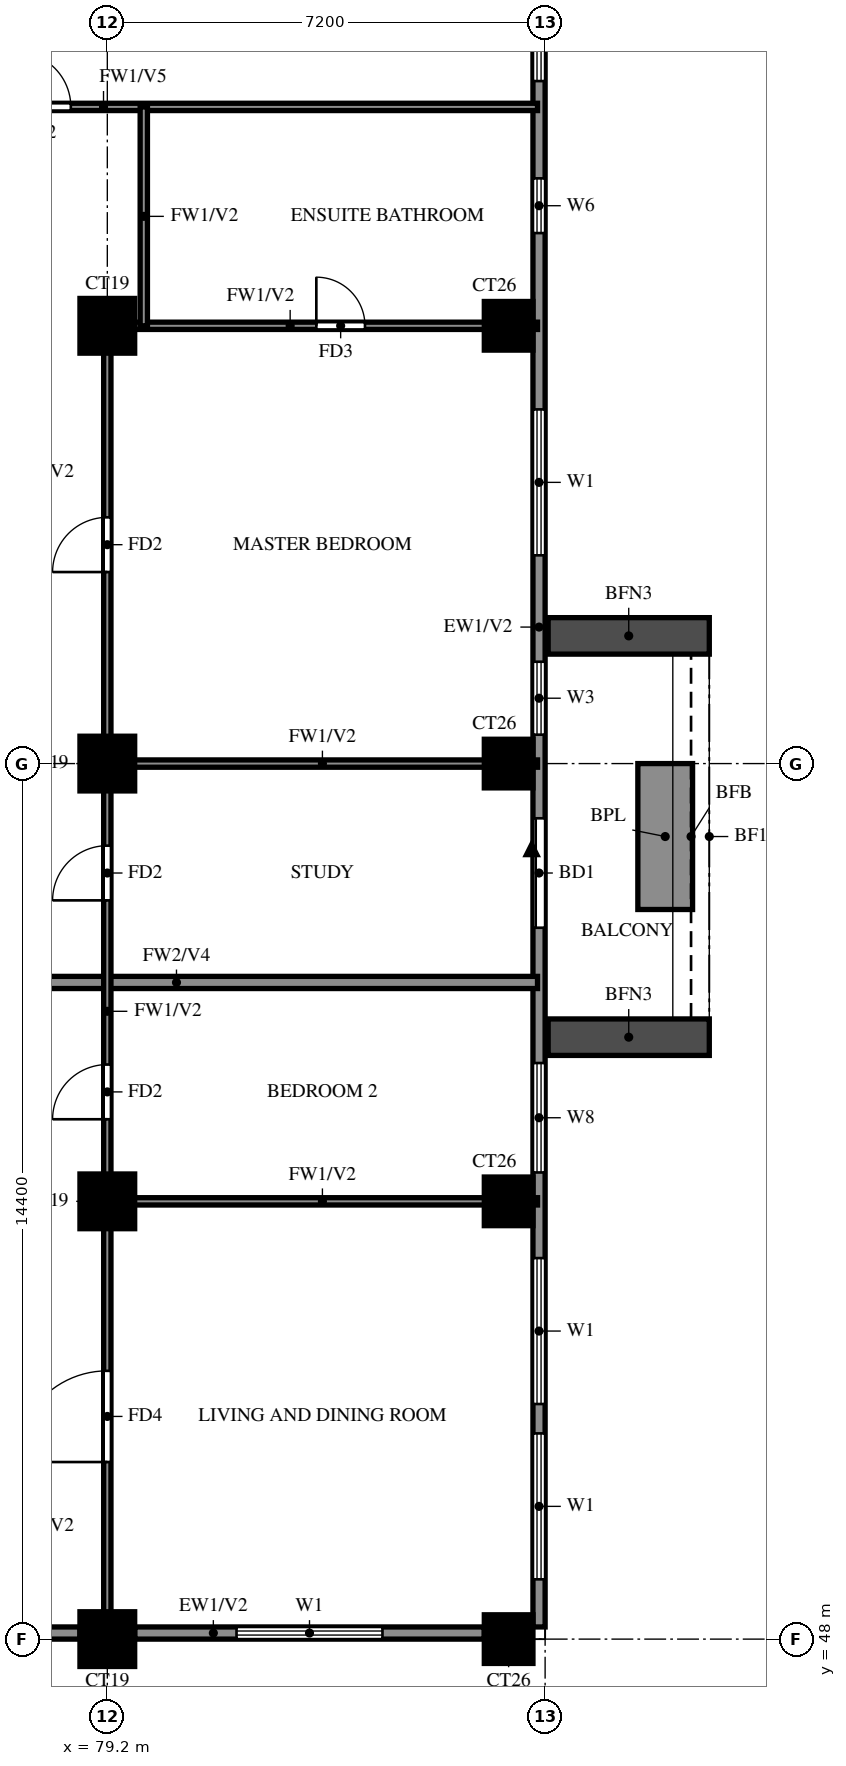
"""IFC4 building model, lengths in metres.
Left out: names, types, materials, properties, quantities, classifications, styles, units other than length and angle.
Written with IfcOpenShell. Run it as: python <this file> out.ifc"""

import sys

from ifc_helpers import new_model, si_unit, direction, frame, frame_2d, origin, origin_2d, place, context, subcontext, project, spatial, rectangle, extrude, source, transform, mapped, element, fill, save


model = new_model("IFC4")
c1 = context("Model", 3, precision=1e-05, world=origin(), true_north=direction((0.0, 1.0)))
c2 = subcontext(c1, "Body", "Model", "MODEL_VIEW")
j1 = project(units=[si_unit("LENGTHUNIT", "METRE"), si_unit("PLANEANGLEUNIT", "RADIAN")], contexts=[c1])
p1 = place(None, origin())
s1 = spatial("IfcSite", under=j1, at=p1, CompositionType="ELEMENT")
p2 = place(p1, origin())
s2 = spatial("IfcBuilding", under=s1, at=p2, CompositionType="ELEMENT")
p3 = place(p2, frame((0.0, 0.0, 178.0)))
s3 = spatial("IfcBuildingStorey", under=s2, at=p3, CompositionType="ELEMENT", Elevation=178.0)
m1 = source(origin(), c2, "Body", "SweptSolid", [
    extrude(rectangle(XDim=0.9, YDim=0.9, at=origin_2d()), origin(), (0.0, 0.0, 1.0), 3.2),
])
p4 = place(p3, frame((79.2, 48.0, 0.0), z_axis=(0.0, 0.0, 1.0), x_axis=(1.0, 0.0, 0.0)))
e1 = element("IfcColumn", 1, at=p4, inside=s3, PredefinedType="COLUMN", context=c2, shape_type="MappedRepresentation", body=[
    mapped(m1, transform((0.0, 0.0, 0.0))),
])
m2 = source(origin(), c2, "Body", "SweptSolid", [
    extrude(rectangle(XDim=0.8, YDim=0.8, at=origin_2d()), origin(), (0.0, 0.0, 1.0), 3.2),
])
p5 = place(p3, frame((85.8, 48.0, 0.0), z_axis=(0.0, 0.0, 1.0), x_axis=(1.0, 0.0, 0.0)))
e2 = element("IfcColumn", 2, at=p5, inside=s3, PredefinedType="COLUMN", context=c2, shape_type="MappedRepresentation", body=[
    mapped(m2, transform((0.0, 0.0, 0.0))),
])
p6 = place(p3, frame((79.2, 55.2, 0.0), z_axis=(0.0, 0.0, 1.0), x_axis=(1.0, 0.0, 0.0)))
e3 = element("IfcColumn", 3, at=p6, inside=s3, PredefinedType="COLUMN", context=c2, shape_type="MappedRepresentation", body=[
    mapped(m1, transform((0.0, 0.0, 0.0))),
])
p7 = place(p3, frame((85.8, 55.2, 0.0), z_axis=(0.0, 0.0, 1.0), x_axis=(1.0, 0.0, 0.0)))
e4 = element("IfcColumn", 4, at=p7, inside=s3, PredefinedType="COLUMN", context=c2, shape_type="MappedRepresentation", body=[
    mapped(m2, transform((0.0, 0.0, 0.0))),
])
p8 = place(p3, frame((79.2, 62.4, 0.0), z_axis=(0.0, 0.0, 1.0), x_axis=(1.0, 0.0, 0.0)))
e5 = element("IfcColumn", 5, at=p8, inside=s3, PredefinedType="COLUMN", context=c2, shape_type="MappedRepresentation", body=[
    mapped(m1, transform((0.0, 0.0, 0.0))),
])
p9 = place(p3, frame((85.8, 62.4, 0.0), z_axis=(0.0, 0.0, 1.0), x_axis=(1.0, 0.0, 0.0)))
e6 = element("IfcColumn", 6, at=p9, inside=s3, PredefinedType="COLUMN", context=c2, shape_type="MappedRepresentation", body=[
    mapped(m2, transform((0.0, 0.0, 0.0))),
])
p10 = place(p3, frame((79.2, 69.6, 0.0), z_axis=(0.0, 0.0, 1.0), x_axis=(1.0, 0.0, 0.0)))
e7 = element("IfcColumn", 7, at=p10, inside=s3, PredefinedType="COLUMN", context=c2, shape_type="MappedRepresentation", body=[
    mapped(m1, transform((0.0, 0.0, 0.0))),
])
p11 = place(p3, frame((85.8, 69.6, 0.0), z_axis=(0.0, 0.0, 1.0), x_axis=(1.0, 0.0, 0.0)))
e8 = element("IfcColumn", 8, at=p11, inside=s3, PredefinedType="COLUMN", context=c2, shape_type="MappedRepresentation", body=[
    mapped(m2, transform((0.0, 0.0, 0.0))),
])
p12 = place(p3, frame((85.719, 39.881, 0.0), z_axis=(0.0, 0.0, 1.0), x_axis=(-0.86377618652, 0.503875678716, 0.0)))
e9 = element("IfcWall", 9, at=p12, inside=s3, PredefinedType="SOLIDWALL", context=c2, shape_type="SweptSolid", body=[
    extrude(rectangle(XDim=16.311, YDim=0.2, at=frame_2d((8.156, 0.0))), origin(), (0.0, 0.0, 1.0), 3.2),
])
p13 = place(p12, frame((13.326, 0.0, 1.5)))
e10 = element("IfcOpeningElement", 10, at=p13, cuts=e9, PredefinedType="OPENING", context=c2, shape_type="SweptSolid", body=[
    extrude(rectangle(XDim=0.9, YDim=0.9, at=frame_2d((0.45, 0.45))), frame((0.0, 0.11, 0.0), z_axis=(0.0, -1.0, 0.0), x_axis=(1.0, 0.0, 0.0)), (0.0, 0.0, 1.0), 0.22),
])
p14 = place(p3, frame((71.99, 48.1, 0.0), z_axis=(0.0, 0.0, 1.0), x_axis=(1.0, 0.0, 0.0)))
e11 = element("IfcWall", 11, at=p14, inside=s3, PredefinedType="SOLIDWALL", context=c2, shape_type="SweptSolid", body=[
    extrude(rectangle(XDim=6.76, YDim=0.2, at=frame_2d((3.38, 0.0))), origin(), (0.0, 0.0, 1.0), 3.2),
])
p15 = place(p14, frame((2.205, 0.0, 1.5)))
e12 = element("IfcOpeningElement", 12, at=p15, cuts=e11, PredefinedType="OPENING", context=c2, shape_type="SweptSolid", body=[
    extrude(rectangle(XDim=0.9, YDim=0.9, at=frame_2d((0.45, 0.45))), frame((0.0, 0.11, 0.0), z_axis=(0.0, -1.0, 0.0), x_axis=(1.0, 0.0, 0.0)), (0.0, 0.0, 1.0), 0.22),
])
p16 = place(p3, frame((79.65, 48.1, 0.0), z_axis=(0.0, 0.0, 1.0), x_axis=(1.0, 0.0, 0.0)))
e13 = element("IfcWall", 13, at=p16, inside=s3, PredefinedType="SOLIDWALL", context=c2, shape_type="SweptSolid", body=[
    extrude(rectangle(XDim=5.75, YDim=0.2, at=frame_2d((2.875, 0.0))), origin(), (0.0, 0.0, 1.0), 3.2),
])
p17 = place(p16, frame((1.675, 0.0, 0.6)))
e14 = element("IfcOpeningElement", 14, at=p17, cuts=e13, PredefinedType="OPENING", context=c2, shape_type="SweptSolid", body=[
    extrude(rectangle(XDim=2.4, YDim=2.4, at=frame_2d((1.2, 1.2))), frame((0.0, 0.11, 0.0), z_axis=(0.0, -1.0, 0.0), x_axis=(1.0, 0.0, 0.0)), (0.0, 0.0, 1.0), 0.22),
])
p18 = place(p3, frame((86.3, 48.2, 0.0), z_axis=(0.0, 0.0, 1.0), x_axis=(0.0, 1.0, 0.0)))
e15 = element("IfcWall", 15, at=p18, inside=s3, PredefinedType="SOLIDWALL", context=c2, shape_type="SweptSolid", body=[
    extrude(rectangle(XDim=28.6, YDim=0.2, at=frame_2d((14.3, 0.0))), origin(), (0.0, 0.0, 1.0), 3.2),
])
p19 = place(p18, frame((11.5, 0.0, 0.0)))
e16 = element("IfcOpeningElement", 16, at=p19, cuts=e15, PredefinedType="OPENING", context=c2, shape_type="SweptSolid", body=[
    extrude(rectangle(XDim=1.8, YDim=2.4, at=frame_2d((0.9, 1.2))), frame((0.0, 0.11, 0.0), z_axis=(0.0, -1.0, 0.0), x_axis=(1.0, 0.0, 0.0)), (0.0, 0.0, 1.0), 0.22),
])
p20 = place(p18, frame((0.783, 0.0, 0.6)))
e17 = element("IfcOpeningElement", 17, at=p20, cuts=e15, PredefinedType="OPENING", context=c2, shape_type="SweptSolid", body=[
    extrude(rectangle(XDim=2.4, YDim=2.4, at=frame_2d((1.2, 1.2))), frame((0.0, 0.11, 0.0), z_axis=(0.0, -1.0, 0.0), x_axis=(1.0, 0.0, 0.0)), (0.0, 0.0, 1.0), 0.22),
])
p21 = place(p18, frame((3.667, 0.0, 0.6)))
e18 = element("IfcOpeningElement", 18, at=p21, cuts=e15, PredefinedType="OPENING", context=c2, shape_type="SweptSolid", body=[
    extrude(rectangle(XDim=2.4, YDim=2.4, at=frame_2d((1.2, 1.2))), frame((0.0, 0.11, 0.0), z_axis=(0.0, -1.0, 0.0), x_axis=(1.0, 0.0, 0.0)), (0.0, 0.0, 1.0), 0.22),
])
p22 = place(p18, frame((7.475, 0.0, 0.6)))
e19 = element("IfcOpeningElement", 19, at=p22, cuts=e15, PredefinedType="OPENING", context=c2, shape_type="SweptSolid", body=[
    extrude(rectangle(XDim=1.8, YDim=2.4, at=frame_2d((0.9, 1.2))), frame((0.0, 0.11, 0.0), z_axis=(0.0, -1.0, 0.0), x_axis=(1.0, 0.0, 0.0)), (0.0, 0.0, 1.0), 0.22),
])
p23 = place(p18, frame((14.675, 0.0, 0.6)))
e20 = element("IfcOpeningElement", 20, at=p23, cuts=e15, PredefinedType="OPENING", context=c2, shape_type="SweptSolid", body=[
    extrude(rectangle(XDim=1.2, YDim=2.4, at=frame_2d((0.6, 1.2))), frame((0.0, 0.11, 0.0), z_axis=(0.0, -1.0, 0.0), x_axis=(1.0, 0.0, 0.0)), (0.0, 0.0, 1.0), 0.22),
])
p24 = place(p18, frame((17.625, 0.0, 0.6)))
e21 = element("IfcOpeningElement", 21, at=p24, cuts=e15, PredefinedType="OPENING", context=c2, shape_type="SweptSolid", body=[
    extrude(rectangle(XDim=2.4, YDim=2.4, at=frame_2d((1.2, 1.2))), frame((0.0, 0.11, 0.0), z_axis=(0.0, -1.0, 0.0), x_axis=(1.0, 0.0, 0.0)), (0.0, 0.0, 1.0), 0.22),
])
p25 = place(p18, frame((22.925, 0.0, 1.5)))
e22 = element("IfcOpeningElement", 22, at=p25, cuts=e15, PredefinedType="OPENING", context=c2, shape_type="SweptSolid", body=[
    extrude(rectangle(XDim=0.9, YDim=0.9, at=frame_2d((0.45, 0.45))), frame((0.0, 0.11, 0.0), z_axis=(0.0, -1.0, 0.0), x_axis=(1.0, 0.0, 0.0)), (0.0, 0.0, 1.0), 0.22),
])
p26 = place(p18, frame((25.425, 0.0, 0.6)))
e23 = element("IfcOpeningElement", 23, at=p26, cuts=e15, PredefinedType="OPENING", context=c2, shape_type="SweptSolid", body=[
    extrude(rectangle(XDim=2.4, YDim=2.4, at=frame_2d((1.2, 1.2))), frame((0.0, 0.11, 0.0), z_axis=(0.0, -1.0, 0.0), x_axis=(1.0, 0.0, 0.0)), (0.0, 0.0, 1.0), 0.22),
])
for number, where, z_axis, x_axis in (
    (24, (86.45, 57.9, 0.0), (0.0, 0.0, 1.0), (1.0, 0.0, 0.0)),
    (25, (86.45, 64.5, 0.0), (0.0, 0.0, 1.0), (1.0, 0.0, 0.0)),
):
    element("IfcWall", number, at=place(p3, frame(where, z_axis=z_axis, x_axis=x_axis)), inside=s3, PredefinedType="SOLIDWALL", context=c2, shape_type="SweptSolid", body=[
        extrude(rectangle(XDim=2.65, YDim=0.6, at=frame_2d((1.325, 0.0))), origin(), (0.0, 0.0, 1.0), 2.85),
    ])
p27 = place(p3, frame((88.375, 60.0, 0.0), z_axis=(0.0, 0.0, 1.0), x_axis=(0.0, 1.0, 0.0)))
e26 = element("IfcWall", 26, at=p27, inside=s3, PredefinedType="SOLIDWALL", context=c2, shape_type="SweptSolid", body=[
    extrude(rectangle(XDim=2.4, YDim=0.9, at=frame_2d((1.2, 0.0))), origin(), (0.0, 0.0, 1.0), 0.9),
])
p28 = place(p3, frame((74.4, 58.8, 0.0), z_axis=(0.0, 0.0, 1.0), x_axis=(1.0, 0.0, 0.0)))
e27 = element("IfcWall", 27, at=p28, inside=s3, PredefinedType="SOLIDWALL", context=c2, shape_type="SweptSolid", body=[
    extrude(rectangle(XDim=11.875, YDim=0.2, at=frame_2d((5.938, 0.0))), origin(), (0.0, 0.0, 1.0), 2.3),
])
for number, where, z_axis, x_axis in (
    (28, (79.2, 55.2, 0.0), (0.0, 0.0, 1.0), (1.0, 0.0, 0.0)),
    (29, (79.2, 62.4, 0.0), (0.0, 0.0, 1.0), (1.0, 0.0, 0.0)),
):
    element("IfcWall", number, at=place(p3, frame(where, z_axis=z_axis, x_axis=x_axis)), inside=s3, PredefinedType="PARTITIONING", context=c2, shape_type="SweptSolid", body=[
        extrude(rectangle(XDim=7.075, YDim=0.12, at=frame_2d((3.538, 0.0))), origin(), (0.0, 0.0, 1.0), 3.2),
    ])
p29 = place(p3, frame((79.2, 69.6, 0.0), z_axis=(0.0, 0.0, 1.0), x_axis=(1.0, 0.0, 0.0)))
e30 = element("IfcWall", 30, at=p29, inside=s3, PredefinedType="PARTITIONING", context=c2, shape_type="SweptSolid", body=[
    extrude(rectangle(XDim=7.075, YDim=0.12, at=frame_2d((3.538, 0.0))), origin(), (0.0, 0.0, 1.0), 3.2),
])
p30 = place(p29, frame((3.438, 0.0, 0.0)))
e31 = element("IfcOpeningElement", 31, at=p30, cuts=e30, PredefinedType="OPENING", context=c2, shape_type="SweptSolid", body=[
    extrude(rectangle(XDim=0.8, YDim=2.1, at=frame_2d((0.4, 1.05))), frame((0.0, 0.07, 0.0), z_axis=(0.0, -1.0, 0.0), x_axis=(1.0, 0.0, 0.0)), (0.0, 0.0, 1.0), 0.14),
])
p31 = place(p3, frame((72.0, 73.2, 0.0), z_axis=(0.0, 0.0, 1.0), x_axis=(1.0, 0.0, 0.0)))
e32 = element("IfcWall", 32, at=p31, inside=s3, PredefinedType="PARTITIONING", context=c2, shape_type="SweptSolid", body=[
    extrude(rectangle(XDim=14.275, YDim=0.12, at=frame_2d((7.137, 0.0))), origin(), (0.0, 0.0, 1.0), 2.3),
])
p32 = place(p31, frame((5.7, 0.0, 0.0)))
e33 = element("IfcOpeningElement", 33, at=p32, cuts=e32, PredefinedType="OPENING", context=c2, shape_type="SweptSolid", body=[
    extrude(rectangle(XDim=0.9, YDim=2.1, at=frame_2d((0.45, 1.05))), frame((0.0, 0.07, 0.0), z_axis=(0.0, -1.0, 0.0), x_axis=(1.0, 0.0, 0.0)), (0.0, 0.0, 1.0), 0.14),
])
p33 = place(p3, frame((79.2, 48.125, 0.0), z_axis=(0.0, 0.0, 1.0), x_axis=(0.0, 1.0, 0.0)))
e34 = element("IfcWall", 34, at=p33, inside=s3, PredefinedType="PARTITIONING", context=c2, shape_type="SweptSolid", body=[
    extrude(rectangle(XDim=21.475, YDim=0.12, at=frame_2d((10.738, 0.0))), origin(), (0.0, 0.0, 1.0), 3.2),
])
p34 = place(p33, frame((2.788, 0.0, 0.0)))
e35 = element("IfcOpeningElement", 35, at=p34, cuts=e34, PredefinedType="OPENING", context=c2, shape_type="SweptSolid", body=[
    extrude(rectangle(XDim=1.5, YDim=2.1, at=frame_2d((0.75, 1.05))), frame((0.0, 0.07, 0.0), z_axis=(0.0, -1.0, 0.0), x_axis=(1.0, 0.0, 0.0)), (0.0, 0.0, 1.0), 0.14),
])
p35 = place(p33, frame((8.425, 0.0, 0.0)))
e36 = element("IfcOpeningElement", 36, at=p35, cuts=e34, PredefinedType="OPENING", context=c2, shape_type="SweptSolid", body=[
    extrude(rectangle(XDim=0.9, YDim=2.1, at=frame_2d((0.45, 1.05))), frame((0.0, 0.07, 0.0), z_axis=(0.0, -1.0, 0.0), x_axis=(1.0, 0.0, 0.0)), (0.0, 0.0, 1.0), 0.14),
])
p36 = place(p33, frame((12.025, 0.0, 0.0)))
e37 = element("IfcOpeningElement", 37, at=p36, cuts=e34, PredefinedType="OPENING", context=c2, shape_type="SweptSolid", body=[
    extrude(rectangle(XDim=0.9, YDim=2.1, at=frame_2d((0.45, 1.05))), frame((0.0, 0.07, 0.0), z_axis=(0.0, -1.0, 0.0), x_axis=(1.0, 0.0, 0.0)), (0.0, 0.0, 1.0), 0.14),
])
p37 = place(p33, frame((17.425, 0.0, 0.0)))
e38 = element("IfcOpeningElement", 38, at=p37, cuts=e34, PredefinedType="OPENING", context=c2, shape_type="SweptSolid", body=[
    extrude(rectangle(XDim=0.9, YDim=2.1, at=frame_2d((0.45, 1.05))), frame((0.0, 0.07, 0.0), z_axis=(0.0, -1.0, 0.0), x_axis=(1.0, 0.0, 0.0)), (0.0, 0.0, 1.0), 0.14),
])
p38 = place(p3, frame((79.8, 69.6, 0.0), z_axis=(0.0, 0.0, 1.0), x_axis=(0.0, 1.0, 0.0)))
e39 = element("IfcWall", 39, at=p38, inside=s3, PredefinedType="PARTITIONING", context=c2, shape_type="SweptSolid", body=[
    extrude(rectangle(XDim=3.6, YDim=0.12, at=frame_2d((1.8, 0.0))), origin(), (0.0, 0.0, 1.0), 3.2),
])
p39 = place(p17, origin())
e40 = element("IfcWindow", 40, at=p39, inside=s3, PartitioningType="DOUBLE_PANEL_VERTICAL", PredefinedType="WINDOW", context=c2, shape_type="SweptSolid", body=[
    extrude(rectangle(XDim=2.4, YDim=2.4, at=frame_2d((1.2, 1.2))), frame((0.0, 0.03, 0.0), z_axis=(0.0, -1.0, 0.0), x_axis=(1.0, 0.0, 0.0)), (0.0, 0.0, 1.0), 0.06),
])
fill(e14, e40)
p40 = place(p19, origin())
e41 = element("IfcDoor", 41, at=p40, inside=s3, OperationType="DOUBLE_DOOR_SLIDING", PredefinedType="DOOR", context=c2, shape_type="SweptSolid", body=[
    extrude(rectangle(XDim=1.8, YDim=2.4, at=frame_2d((0.9, 1.2))), frame((0.0, 0.025, 0.0), z_axis=(0.0, -1.0, 0.0), x_axis=(1.0, 0.0, 0.0)), (0.0, 0.0, 1.0), 0.05),
])
fill(e16, e41)
p41 = place(p20, origin())
e42 = element("IfcWindow", 42, at=p41, inside=s3, PartitioningType="DOUBLE_PANEL_VERTICAL", PredefinedType="WINDOW", context=c2, shape_type="SweptSolid", body=[
    extrude(rectangle(XDim=2.4, YDim=2.4, at=frame_2d((1.2, 1.2))), frame((0.0, 0.03, 0.0), z_axis=(0.0, -1.0, 0.0), x_axis=(1.0, 0.0, 0.0)), (0.0, 0.0, 1.0), 0.06),
])
fill(e17, e42)
p42 = place(p21, origin())
e43 = element("IfcWindow", 43, at=p42, inside=s3, PartitioningType="DOUBLE_PANEL_VERTICAL", PredefinedType="WINDOW", context=c2, shape_type="SweptSolid", body=[
    extrude(rectangle(XDim=2.4, YDim=2.4, at=frame_2d((1.2, 1.2))), frame((0.0, 0.03, 0.0), z_axis=(0.0, -1.0, 0.0), x_axis=(1.0, 0.0, 0.0)), (0.0, 0.0, 1.0), 0.06),
])
fill(e18, e43)
p43 = place(p22, origin())
e44 = element("IfcWindow", 44, at=p43, inside=s3, PartitioningType="DOUBLE_PANEL_VERTICAL", PredefinedType="WINDOW", context=c2, shape_type="SweptSolid", body=[
    extrude(rectangle(XDim=1.8, YDim=2.4, at=frame_2d((0.9, 1.2))), frame((0.0, 0.03, 0.0), z_axis=(0.0, -1.0, 0.0), x_axis=(1.0, 0.0, 0.0)), (0.0, 0.0, 1.0), 0.06),
])
fill(e19, e44)
p44 = place(p23, origin())
e45 = element("IfcWindow", 45, at=p44, inside=s3, PartitioningType="SINGLE_PANEL", PredefinedType="WINDOW", context=c2, shape_type="SweptSolid", body=[
    extrude(rectangle(XDim=1.2, YDim=2.4, at=frame_2d((0.6, 1.2))), frame((0.0, 0.03, 0.0), z_axis=(0.0, -1.0, 0.0), x_axis=(1.0, 0.0, 0.0)), (0.0, 0.0, 1.0), 0.06),
])
fill(e20, e45)
p45 = place(p24, origin())
e46 = element("IfcWindow", 46, at=p45, inside=s3, PartitioningType="DOUBLE_PANEL_VERTICAL", PredefinedType="WINDOW", context=c2, shape_type="SweptSolid", body=[
    extrude(rectangle(XDim=2.4, YDim=2.4, at=frame_2d((1.2, 1.2))), frame((0.0, 0.03, 0.0), z_axis=(0.0, -1.0, 0.0), x_axis=(1.0, 0.0, 0.0)), (0.0, 0.0, 1.0), 0.06),
])
fill(e21, e46)
p46 = place(p25, origin())
e47 = element("IfcWindow", 47, at=p46, inside=s3, PartitioningType="SINGLE_PANEL", PredefinedType="WINDOW", context=c2, shape_type="SweptSolid", body=[
    extrude(rectangle(XDim=0.9, YDim=0.9, at=frame_2d((0.45, 0.45))), frame((0.0, 0.03, 0.0), z_axis=(0.0, -1.0, 0.0), x_axis=(1.0, 0.0, 0.0)), (0.0, 0.0, 1.0), 0.06),
])
fill(e22, e47)
p47 = place(p26, origin())
e48 = element("IfcWindow", 48, at=p47, inside=s3, PartitioningType="DOUBLE_PANEL_VERTICAL", PredefinedType="WINDOW", context=c2, shape_type="SweptSolid", body=[
    extrude(rectangle(XDim=2.4, YDim=2.4, at=frame_2d((1.2, 1.2))), frame((0.0, 0.03, 0.0), z_axis=(0.0, -1.0, 0.0), x_axis=(1.0, 0.0, 0.0)), (0.0, 0.0, 1.0), 0.06),
])
fill(e23, e48)
p48 = place(p34, origin())
e49 = element("IfcDoor", 49, at=p48, inside=s3, OperationType="SINGLE_SWING_LEFT", PredefinedType="DOOR", context=c2, shape_type="SweptSolid", body=[
    extrude(rectangle(XDim=1.5, YDim=2.1, at=frame_2d((0.75, 1.05))), frame((0.0, 0.025, 0.0), z_axis=(0.0, -1.0, 0.0), x_axis=(1.0, 0.0, 0.0)), (0.0, 0.0, 1.0), 0.05),
])
fill(e35, e49)
p49 = place(p35, origin())
e50 = element("IfcDoor", 50, at=p49, inside=s3, OperationType="SINGLE_SWING_LEFT", PredefinedType="DOOR", context=c2, shape_type="SweptSolid", body=[
    extrude(rectangle(XDim=0.9, YDim=2.1, at=frame_2d((0.45, 1.05))), frame((0.0, 0.025, 0.0), z_axis=(0.0, -1.0, 0.0), x_axis=(1.0, 0.0, 0.0)), (0.0, 0.0, 1.0), 0.05),
])
fill(e36, e50)
p50 = place(p36, origin())
e51 = element("IfcDoor", 51, at=p50, inside=s3, OperationType="SINGLE_SWING_RIGHT", PredefinedType="DOOR", context=c2, shape_type="SweptSolid", body=[
    extrude(rectangle(XDim=0.9, YDim=2.1, at=frame_2d((0.45, 1.05))), frame((0.0, 0.025, 0.0), z_axis=(0.0, -1.0, 0.0), x_axis=(1.0, 0.0, 0.0)), (0.0, 0.0, 1.0), 0.05),
])
fill(e37, e51)
p51 = place(p37, origin())
e52 = element("IfcDoor", 52, at=p51, inside=s3, OperationType="SINGLE_SWING_LEFT", PredefinedType="DOOR", context=c2, shape_type="SweptSolid", body=[
    extrude(rectangle(XDim=0.9, YDim=2.1, at=frame_2d((0.45, 1.05))), frame((0.0, 0.025, 0.0), z_axis=(0.0, -1.0, 0.0), x_axis=(1.0, 0.0, 0.0)), (0.0, 0.0, 1.0), 0.05),
])
fill(e38, e52)
p52 = place(p30, origin())
e53 = element("IfcDoor", 53, at=p52, inside=s3, OperationType="SINGLE_SWING_LEFT", PredefinedType="DOOR", context=c2, shape_type="SweptSolid", body=[
    extrude(rectangle(XDim=0.8, YDim=2.1, at=frame_2d((0.4, 1.05))), frame((0.0, 0.025, 0.0), z_axis=(0.0, -1.0, 0.0), x_axis=(1.0, 0.0, 0.0)), (0.0, 0.0, 1.0), 0.05),
])
fill(e31, e53)
p53 = place(p32, origin())
e54 = element("IfcDoor", 54, at=p53, inside=s3, OperationType="SINGLE_SWING_RIGHT", PredefinedType="DOOR", context=c2, shape_type="SweptSolid", body=[
    extrude(rectangle(XDim=0.9, YDim=2.1, at=frame_2d((0.45, 1.05))), frame((0.0, 0.025, 0.0), z_axis=(0.0, -1.0, 0.0), x_axis=(1.0, 0.0, 0.0)), (0.0, 0.0, 1.0), 0.05),
])
fill(e33, e54)
save(model, sys.argv[1])
